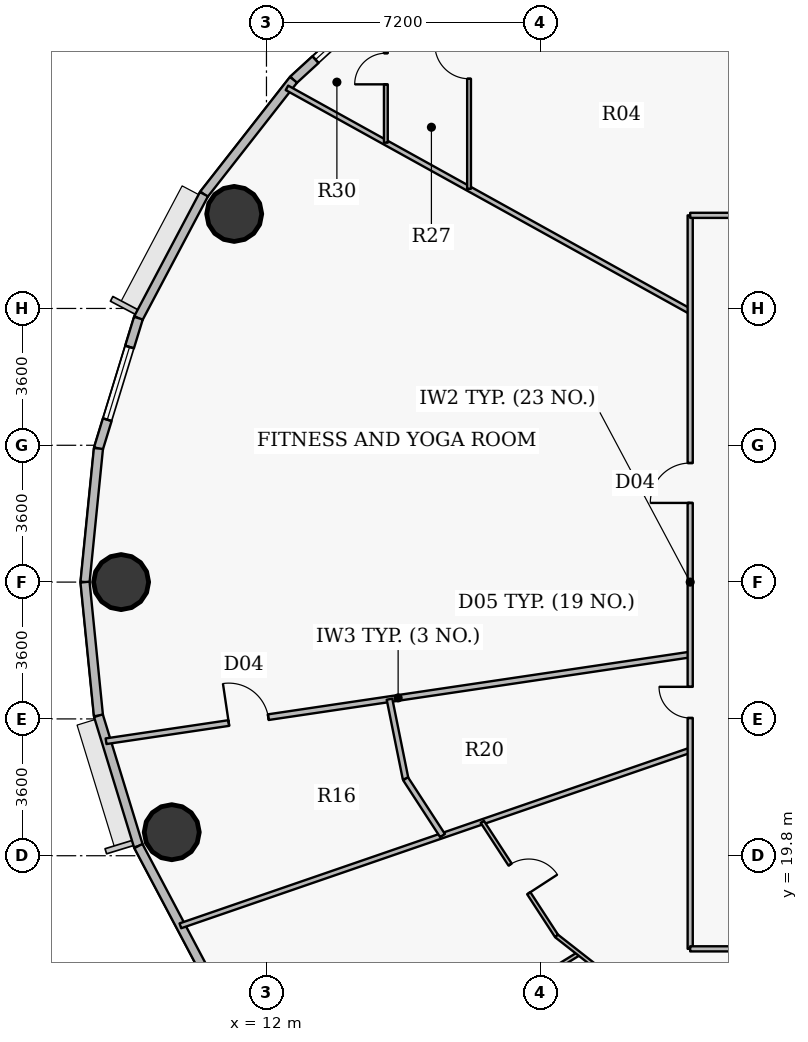
"""IFC4 building model, lengths in metres.
Left out: names, types, materials, properties, quantities, classifications, styles, units other than length and angle.
Written with IfcOpenShell. Run it as: python <this file> out.ifc"""

import sys

from ifc_helpers import new_model, si_unit, direction, frame, frame_2d, origin, origin_2d, place, context, subcontext, project, spatial, rectangle, hollow_circle, extrude, source, transform, mapped, element, fill, save


model = new_model("IFC4")
c1 = context("Model", 3, precision=1e-05, world=origin(), true_north=direction((0.0, 1.0)))
c2 = subcontext(c1, "Body", "Model", "MODEL_VIEW")
j1 = project(units=[si_unit("LENGTHUNIT", "METRE"), si_unit("PLANEANGLEUNIT", "RADIAN")], contexts=[c1])
p1 = place(None, origin())
s1 = spatial("IfcSite", under=j1, at=p1, CompositionType="ELEMENT")
p2 = place(p1, origin())
s2 = spatial("IfcBuilding", under=s1, at=p2, CompositionType="ELEMENT")
p3 = place(p2, frame((0.0, 0.0, 138.45)))
s3 = spatial("IfcBuildingStorey", under=s2, at=p3, CompositionType="ELEMENT", Elevation=138.45)
for number, where, z_axis, x_axis in (
    (1, (11.151, 36.688, 0.0), (0.0, 0.0, 1.0), (1.0, 0.0, 0.0)),
    (2, (8.175, 27.0, 0.0), (0.0, 0.0, 1.0), (1.0, 0.0, 0.0)),
    (3, (9.507, 20.419, 0.0), (0.0, 0.0, 1.0), (1.0, 0.0, 0.0)),
):
    element("IfcColumn", number, at=place(p3, frame(where, z_axis=z_axis, x_axis=x_axis)), inside=s3, PredefinedType="COLUMN", context=c2, shape_type="SweptSolid", body=[
        extrude(hollow_circle(Radius=0.725, WallThickness=0.042, at=origin_2d()), origin(), (0.0, 0.0, 1.0), 3.75),
    ])
p4 = place(p3, frame((12.711, 40.217, 0.0), z_axis=(0.0, 0.0, 1.0), x_axis=(0.737113356241, 0.675769117414, 0.0)))
e4 = element("IfcWall", 4, at=p4, inside=s3, PredefinedType="SOLIDWALL", context=c2, shape_type="SweptSolid", body=[
    extrude(rectangle(XDim=3.976, YDim=0.24, at=frame_2d((1.988, 0.0))), origin(), (0.0, 0.0, 1.0), 3.5),
])
p5 = place(p4, frame((0.787, 0.0, 0.9)))
e5 = element("IfcOpeningElement", 5, at=p5, cuts=e4, PredefinedType="OPENING", context=c2, shape_type="SweptSolid", body=[
    extrude(rectangle(XDim=2.0, YDim=1.75, at=origin_2d()), frame((1.0, 0.13, 0.875), z_axis=(0.0, -1.0, 0.0), x_axis=(1.0, 0.0, 0.0)), (0.0, 0.0, 1.0), 0.26),
])
p6 = place(p3, frame((10.355, 37.206, 0.0), z_axis=(0.0, 0.0, 1.0), x_axis=(0.616272103517, 0.787533297345, 0.0)))
e6 = element("IfcWall", 6, at=p6, inside=s3, PredefinedType="SOLIDWALL", context=c2, shape_type="SweptSolid", body=[
    extrude(rectangle(XDim=3.823, YDim=0.24, at=frame_2d((1.912, 0.0))), origin(), (0.0, 0.0, 1.0), 3.5),
])
p7 = place(p3, frame((8.63, 33.945, 0.0), z_axis=(0.0, 0.0, 1.0), x_axis=(0.467614004126, 0.883932770716, 0.0)))
e7 = element("IfcWall", 7, at=p7, inside=s3, PredefinedType="SOLIDWALL", context=c2, shape_type="SweptSolid", body=[
    extrude(rectangle(XDim=3.689, YDim=0.24, at=frame_2d((1.844, 0.0))), origin(), (0.0, 0.0, 1.0), 3.5),
])
p8 = place(p3, frame((7.578, 30.515, 0.0), z_axis=(0.0, 0.0, 1.0), x_axis=(0.293124431344, 0.956074300329, 0.0)))
e8 = element("IfcWall", 8, at=p8, inside=s3, PredefinedType="SOLIDWALL", context=c2, shape_type="SweptSolid", body=[
    extrude(rectangle(XDim=3.587, YDim=0.24, at=frame_2d((1.793, 0.0))), origin(), (0.0, 0.0, 1.0), 3.5),
])
p9 = place(p8, frame((0.794, 0.0, 0.9)))
e9 = element("IfcOpeningElement", 9, at=p9, cuts=e8, PredefinedType="OPENING", context=c2, shape_type="SweptSolid", body=[
    extrude(rectangle(XDim=2.0, YDim=1.75, at=origin_2d()), frame((1.0, 0.13, 0.875), z_axis=(0.0, -1.0, 0.0), x_axis=(1.0, 0.0, 0.0)), (0.0, 0.0, 1.0), 0.26),
])
for number, where, z_axis, x_axis in (
    (10, (7.225, 27.0, 0.0), (0.0, 0.0, 1.0), (0.1, 0.995, 0.0)),
    (11, (7.578, 23.485, 0.0), (0.0, 0.0, 1.0), (-0.1, 0.995, 0.0)),
):
    element("IfcWall", number, at=place(p3, frame(where, z_axis=z_axis, x_axis=x_axis)), inside=s3, PredefinedType="SOLIDWALL", context=c2, shape_type="SweptSolid", body=[
        extrude(rectangle(XDim=3.533, YDim=0.24, at=frame_2d((1.767, 0.0))), origin(), (0.0, 0.0, 1.0), 3.5),
    ])
p10 = place(p3, frame((8.63, 20.055, 0.0), z_axis=(0.0, 0.0, 1.0), x_axis=(-0.293124431344, 0.956074300329, 0.0)))
e12 = element("IfcWall", 12, at=p10, inside=s3, PredefinedType="SOLIDWALL", context=c2, shape_type="SweptSolid", body=[
    extrude(rectangle(XDim=3.587, YDim=0.24, at=frame_2d((1.793, 0.0))), origin(), (0.0, 0.0, 1.0), 3.5),
])
p11 = place(p3, frame((10.355, 16.794, 0.0), z_axis=(0.0, 0.0, 1.0), x_axis=(-0.467614004126, 0.883932770716, 0.0)))
e13 = element("IfcWall", 13, at=p11, inside=s3, PredefinedType="SOLIDWALL", context=c2, shape_type="SweptSolid", body=[
    extrude(rectangle(XDim=3.689, YDim=0.24, at=frame_2d((1.844, 0.0))), origin(), (0.0, 0.0, 1.0), 3.5),
])
p12 = place(p3, frame((7.779, 22.812, 0.0), z_axis=(0.0, 0.0, 1.0), x_axis=(0.989169524168, 0.146777561148, 0.0)))
e14 = element("IfcWall", 14, at=p12, inside=s3, PredefinedType="PARTITIONING", context=c2, shape_type="SweptSolid", body=[
    extrude(rectangle(XDim=15.539, YDim=0.15, at=frame_2d((7.77, 0.0))), origin(), (0.0, 0.0, 1.0), 2.935),
])
p13 = place(p12, frame((3.265, 0.0, 0.0)))
e15 = element("IfcOpeningElement", 15, at=p13, cuts=e14, PredefinedType="OPENING", context=c2, shape_type="SweptSolid", body=[
    extrude(rectangle(XDim=1.05, YDim=2.15, at=origin_2d()), frame((0.525, 0.085, 1.075), z_axis=(0.0, -1.0, 0.0), x_axis=(1.0, 0.0, 0.0)), (0.0, 0.0, 1.0), 0.17),
])
p14 = place(p3, frame((9.735, 17.956, 0.0), z_axis=(0.0, 0.0, 1.0), x_axis=(0.945515704768, 0.325576491836, 0.0)))
e16 = element("IfcWall", 16, at=p14, inside=s3, PredefinedType="PARTITIONING", context=c2, shape_type="SweptSolid", body=[
    extrude(rectangle(XDim=14.188, YDim=0.135, at=frame_2d((7.094, 0.0))), origin(), (0.0, 0.0, 1.0), 2.935),
])
p15 = place(p3, frame((12.539, 40.005, 0.0), z_axis=(0.0, 0.0, 1.0), x_axis=(0.874619146564, -0.484810631549, 0.0)))
e17 = element("IfcWall", 17, at=p15, inside=s3, PredefinedType="PARTITIONING", context=c2, shape_type="SweptSolid", body=[
    extrude(rectangle(XDim=12.132, YDim=0.135, at=frame_2d((6.066, 0.0))), origin(), (0.0, 0.0, 1.0), 2.935),
])
p16 = place(p3, frame((13.494, 13.059, 0.0), z_axis=(0.0, 0.0, 1.0), x_axis=(0.850110644983, 0.526604112486, 0.0)))
e18 = element("IfcWall", 18, at=p16, inside=s3, PredefinedType="PARTITIONING", context=c2, shape_type="SweptSolid", body=[
    extrude(rectangle(XDim=7.916, YDim=0.1, at=frame_2d((3.958, 0.0))), origin(), (0.0, 0.0, 1.0), 2.935),
])
p17 = place(p3, frame((15.142, 38.562, 0.0), z_axis=(0.0, 0.0, 1.0), x_axis=(0.0, 1.0, 0.0)))
e19 = element("IfcWall", 19, at=p17, inside=s3, PredefinedType="PARTITIONING", context=c2, shape_type="SweptSolid", body=[
    extrude(rectangle(XDim=3.89, YDim=0.1, at=frame_2d((1.945, 0.0))), origin(), (0.0, 0.0, 1.0), 2.935),
])
p18 = place(p17, frame((1.535, 0.0, 0.0)))
e20 = element("IfcOpeningElement", 20, at=p18, cuts=e19, PredefinedType="OPENING", context=c2, shape_type="SweptSolid", body=[
    extrude(rectangle(XDim=0.82, YDim=2.1, at=origin_2d()), frame((0.41, 0.06, 1.05), z_axis=(0.0, -1.0, 0.0), x_axis=(1.0, 0.0, 0.0)), (0.0, 0.0, 1.0), 0.12),
])
p19 = place(p3, frame((15.237, 23.919, 0.0), z_axis=(0.0, 0.0, 1.0), x_axis=(0.198269330309, -0.98014757698, 0.0)))
e21 = element("IfcWall", 21, at=p19, inside=s3, PredefinedType="PARTITIONING", context=c2, shape_type="SweptSolid", body=[
    extrude(rectangle(XDim=2.136, YDim=0.15, at=frame_2d((1.068, 0.0))), origin(), (0.0, 0.0, 1.0), 2.935),
])
p20 = place(p3, frame((15.661, 21.825, 0.0), z_axis=(0.0, 0.0, 1.0), x_axis=(0.54543603077, -0.838152454114, 0.0)))
e22 = element("IfcWall", 22, at=p20, inside=s3, PredefinedType="PARTITIONING", context=c2, shape_type="SweptSolid", body=[
    extrude(rectangle(XDim=1.782, YDim=0.15, at=frame_2d((0.891, 0.0))), origin(), (0.0, 0.0, 1.0), 2.935),
])
p21 = place(p3, frame((17.331, 37.348, 0.0), z_axis=(0.0, 0.0, 1.0), x_axis=(0.0, 1.0, 0.0)))
e23 = element("IfcWall", 23, at=p21, inside=s3, PredefinedType="PARTITIONING", context=c2, shape_type="SweptSolid", body=[
    extrude(rectangle(XDim=6.691, YDim=0.1, at=frame_2d((3.345, 0.0))), origin(), (0.0, 0.0, 1.0), 2.935),
])
p22 = place(p21, frame((2.895, 0.0, 0.0)))
e24 = element("IfcOpeningElement", 24, at=p22, cuts=e23, PredefinedType="OPENING", context=c2, shape_type="SweptSolid", body=[
    extrude(rectangle(XDim=0.9, YDim=2.1, at=origin_2d()), frame((0.45, 0.06, 1.05), z_axis=(0.0, -1.0, 0.0), x_axis=(1.0, 0.0, 0.0)), (0.0, 0.0, 1.0), 0.12),
])
p23 = place(p3, frame((17.68, 20.692, 0.0), z_axis=(0.0, 0.0, 1.0), x_axis=(0.545371539428, -0.838194418964, 0.0)))
e25 = element("IfcWall", 25, at=p23, inside=s3, PredefinedType="PARTITIONING", context=c2, shape_type="SweptSolid", body=[
    extrude(rectangle(XDim=3.583, YDim=0.1, at=frame_2d((1.791, 0.0))), origin(), (0.0, 0.0, 1.0), 3.5),
])
p24 = place(p23, frame((1.341, 0.0, 0.0)))
e26 = element("IfcOpeningElement", 26, at=p24, cuts=e25, PredefinedType="OPENING", context=c2, shape_type="SweptSolid", body=[
    extrude(rectangle(XDim=0.9, YDim=2.1, at=origin_2d()), frame((0.45, 0.06, 1.05), z_axis=(0.0, -1.0, 0.0), x_axis=(1.0, 0.0, 0.0)), (0.0, 0.0, 1.0), 0.12),
])
p25 = place(p3, frame((19.634, 17.689, 0.0), z_axis=(0.0, 0.0, 1.0), x_axis=(0.787341639438, -0.616516944461, 0.0)))
e27 = element("IfcWall", 27, at=p25, inside=s3, PredefinedType="PARTITIONING", context=c2, shape_type="SweptSolid", body=[
    extrude(rectangle(XDim=4.069, YDim=0.1, at=frame_2d((2.034, 0.0))), origin(), (0.0, 0.0, 1.0), 2.935),
])
p26 = place(p3, frame((21.01, 46.133, 0.0), z_axis=(0.0, 0.0, 1.0), x_axis=(0.616738538538, -0.787168072956, 0.0)))
e28 = element("IfcWall", 28, at=p26, inside=s3, PredefinedType="PARTITIONING", context=c2, shape_type="SweptSolid", body=[
    extrude(rectangle(XDim=7.312, YDim=0.1, at=frame_2d((3.656, 0.0))), origin(), (0.0, 0.0, 1.0), 2.935),
])
p27 = place(p26, frame((3.206, 0.0, 0.0)))
e29 = element("IfcOpeningElement", 29, at=p27, cuts=e28, PredefinedType="OPENING", context=c2, shape_type="SweptSolid", body=[
    extrude(rectangle(XDim=0.9, YDim=2.1, at=origin_2d()), frame((0.45, 0.06, 1.05), z_axis=(0.0, -1.0, 0.0), x_axis=(1.0, 0.0, 0.0)), (0.0, 0.0, 1.0), 0.12),
])
p28 = place(p3, frame((23.15, 17.35, 0.0), z_axis=(0.0, 0.0, 1.0), x_axis=(0.0, 1.0, 0.0)))
e30 = element("IfcWall", 30, at=p28, inside=s3, PredefinedType="PARTITIONING", context=c2, shape_type="SweptSolid", body=[
    extrude(rectangle(XDim=19.3, YDim=0.135, at=frame_2d((9.65, 0.0))), origin(), (0.0, 0.0, 1.0), 2.935),
])
p29 = place(p28, frame((11.733, 0.0, 0.0)))
e31 = element("IfcOpeningElement", 31, at=p29, cuts=e30, PredefinedType="OPENING", context=c2, shape_type="SweptSolid", body=[
    extrude(rectangle(XDim=1.05, YDim=2.15, at=origin_2d()), frame((0.525, 0.078, 1.075), z_axis=(0.0, -1.0, 0.0), x_axis=(1.0, 0.0, 0.0)), (0.0, 0.0, 1.0), 0.155),
])
p30 = place(p28, frame((6.074, 0.0, 0.0)))
e32 = element("IfcOpeningElement", 32, at=p30, cuts=e30, PredefinedType="OPENING", context=c2, shape_type="SweptSolid", body=[
    extrude(rectangle(XDim=0.82, YDim=2.1, at=origin_2d()), frame((0.41, 0.078, 1.05), z_axis=(0.0, -1.0, 0.0), x_axis=(1.0, 0.0, 0.0)), (0.0, 0.0, 1.0), 0.155),
])
p31 = place(p3, frame((23.15, 17.35, 0.0), z_axis=(0.0, 0.0, 1.0), x_axis=(1.0, 0.0, 0.0)))
e33 = element("IfcWall", 33, at=p31, inside=s3, PredefinedType="PARTITIONING", context=c2, shape_type="SweptSolid", body=[
    extrude(rectangle(XDim=8.318, YDim=0.135, at=frame_2d((4.159, 0.0))), origin(), (0.0, 0.0, 1.0), 2.935),
])
p32 = place(p31, frame((3.659, 0.0, 0.0)))
e34 = element("IfcOpeningElement", 34, at=p32, cuts=e33, PredefinedType="OPENING", context=c2, shape_type="SweptSolid", body=[
    extrude(rectangle(XDim=1.0, YDim=2.15, at=origin_2d()), frame((0.5, 0.078, 1.075), z_axis=(0.0, -1.0, 0.0), x_axis=(1.0, 0.0, 0.0)), (0.0, 0.0, 1.0), 0.155),
])
p33 = place(p3, frame((23.15, 36.65, 0.0), z_axis=(0.0, 0.0, 1.0), x_axis=(1.0, 0.0, 0.0)))
e35 = element("IfcWall", 35, at=p33, inside=s3, PredefinedType="PARTITIONING", context=c2, shape_type="SweptSolid", body=[
    extrude(rectangle(XDim=10.236, YDim=0.135, at=frame_2d((5.118, 0.0))), origin(), (0.0, 0.0, 1.0), 2.935),
])
p34 = place(p33, frame((4.618, 0.0, 0.0)))
e36 = element("IfcOpeningElement", 36, at=p34, cuts=e35, PredefinedType="OPENING", context=c2, shape_type="SweptSolid", body=[
    extrude(rectangle(XDim=1.0, YDim=2.15, at=origin_2d()), frame((0.5, 0.078, 1.075), z_axis=(0.0, -1.0, 0.0), x_axis=(1.0, 0.0, 0.0)), (0.0, 0.0, 1.0), 0.155),
])
m1 = source(origin(), c2, "Body", "SweptSolid", [
    extrude(rectangle(XDim=2.0, YDim=1.75, at=origin_2d()), frame((1.0, 0.03, 0.875), z_axis=(0.0, -1.0, 0.0), x_axis=(1.0, 0.0, 0.0)), (0.0, 0.0, 1.0), 0.06),
])
p35 = place(p5, origin())
e37 = element("IfcWindow", 37, at=p35, inside=s3, PartitioningType="DOUBLE_PANEL_VERTICAL", PredefinedType="WINDOW", context=c2, shape_type="MappedRepresentation", body=[
    mapped(m1, transform((0.0, 0.0, 0.0), x_axis=(1.0, 0.0, 0.0), y_axis=(0.0, 1.0, 0.0), z_axis=(0.0, 0.0, 1.0), scale=1.0)),
])
fill(e5, e37)
p36 = place(p9, origin())
e38 = element("IfcWindow", 38, at=p36, inside=s3, PartitioningType="DOUBLE_PANEL_VERTICAL", PredefinedType="WINDOW", context=c2, shape_type="MappedRepresentation", body=[
    mapped(m1, transform((0.0, 0.0, 0.0), x_axis=(1.0, 0.0, 0.0), y_axis=(0.0, 1.0, 0.0), z_axis=(0.0, 0.0, 1.0), scale=1.0)),
])
fill(e9, e38)
m2 = source(origin(), c2, "Body", "SweptSolid", [
    extrude(rectangle(XDim=0.9, YDim=2.1, at=origin_2d()), frame((0.45, 0.025, 1.05), z_axis=(0.0, -1.0, 0.0), x_axis=(1.0, 0.0, 0.0)), (0.0, 0.0, 1.0), 0.05),
])
p37 = place(p24, origin())
e39 = element("IfcDoor", 39, at=p37, inside=s3, OperationType="SINGLE_SWING_RIGHT", PredefinedType="DOOR", context=c2, shape_type="MappedRepresentation", body=[
    mapped(m2, transform((0.0, 0.0, 0.0), x_axis=(1.0, 0.0, 0.0), y_axis=(0.0, 1.0, 0.0), z_axis=(0.0, 0.0, 1.0), scale=1.0)),
])
fill(e26, e39)
p38 = place(p22, origin())
e40 = element("IfcDoor", 40, at=p38, inside=s3, OperationType="SINGLE_SWING_RIGHT", PredefinedType="DOOR", context=c2, shape_type="MappedRepresentation", body=[
    mapped(m2, transform((0.0, 0.0, 0.0), x_axis=(1.0, 0.0, 0.0), y_axis=(0.0, 1.0, 0.0), z_axis=(0.0, 0.0, 1.0), scale=1.0)),
])
fill(e24, e40)
m3 = source(origin(), c2, "Body", "SweptSolid", [
    extrude(rectangle(XDim=0.82, YDim=2.1, at=origin_2d()), frame((0.41, 0.025, 1.05), z_axis=(0.0, -1.0, 0.0), x_axis=(1.0, 0.0, 0.0)), (0.0, 0.0, 1.0), 0.05),
])
p39 = place(p18, origin())
e41 = element("IfcDoor", 41, at=p39, inside=s3, OperationType="SINGLE_SWING_LEFT", PredefinedType="DOOR", context=c2, shape_type="MappedRepresentation", body=[
    mapped(m3, transform((0.0, 0.0, 0.0), x_axis=(1.0, 0.0, 0.0), y_axis=(0.0, 1.0, 0.0), z_axis=(0.0, 0.0, 1.0), scale=1.0)),
])
fill(e20, e41)
m4 = source(origin(), c2, "Body", "SweptSolid", [
    extrude(rectangle(XDim=1.05, YDim=2.15, at=origin_2d()), frame((0.525, 0.025, 1.075), z_axis=(0.0, -1.0, 0.0), x_axis=(1.0, 0.0, 0.0)), (0.0, 0.0, 1.0), 0.05),
])
p40 = place(p29, origin())
e42 = element("IfcDoor", 42, at=p40, inside=s3, OperationType="SINGLE_SWING_LEFT", PredefinedType="DOOR", context=c2, shape_type="MappedRepresentation", body=[
    mapped(m4, transform((0.0, 0.0, 0.0), x_axis=(1.0, 0.0, 0.0), y_axis=(0.0, 1.0, 0.0), z_axis=(0.0, 0.0, 1.0), scale=1.0)),
])
fill(e31, e42)
p41 = place(p30, origin())
e43 = element("IfcDoor", 43, at=p41, inside=s3, OperationType="SINGLE_SWING_RIGHT", PredefinedType="DOOR", context=c2, shape_type="MappedRepresentation", body=[
    mapped(m3, transform((0.0, 0.0, 0.0), x_axis=(1.0, 0.0, 0.0), y_axis=(0.0, 1.0, 0.0), z_axis=(0.0, 0.0, 1.0), scale=1.0)),
])
fill(e32, e43)
p42 = place(p13, origin())
e44 = element("IfcDoor", 44, at=p42, inside=s3, OperationType="SINGLE_SWING_LEFT", PredefinedType="DOOR", context=c2, shape_type="MappedRepresentation", body=[
    mapped(m4, transform((0.0, 0.0, 0.0), x_axis=(1.0, 0.0, 0.0), y_axis=(0.0, 1.0, 0.0), z_axis=(0.0, 0.0, 1.0), scale=1.0)),
])
fill(e15, e44)
save(model, sys.argv[1])
